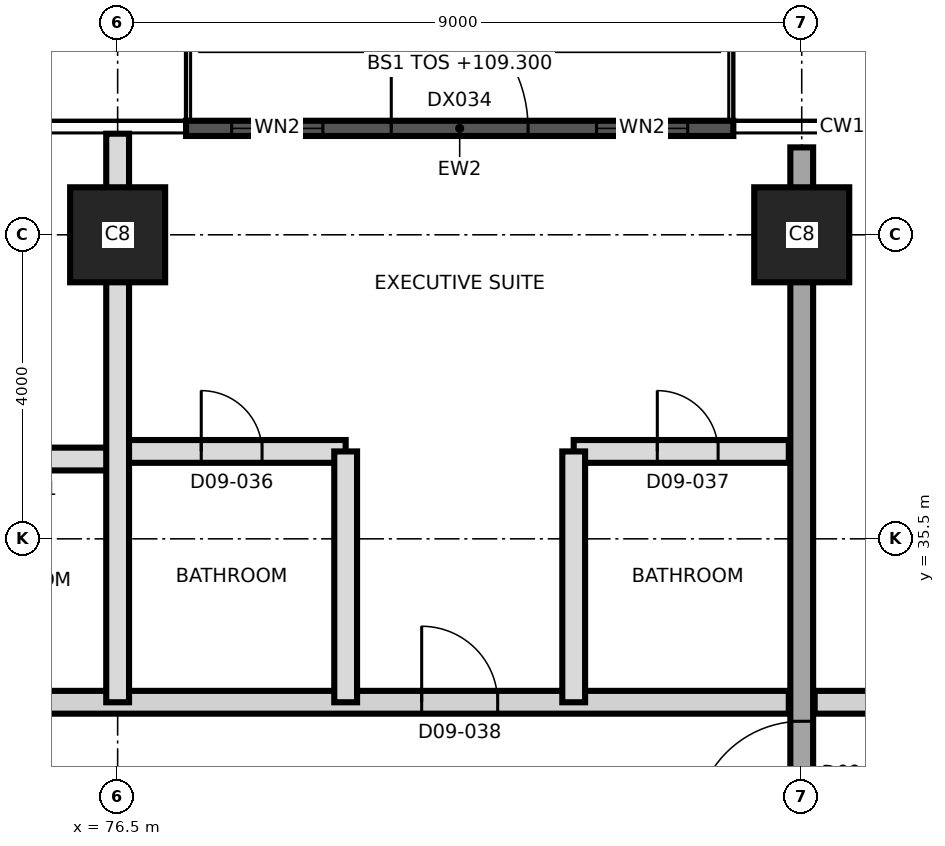
"""IFC4 building model, lengths in metres.
Left out: names, types, materials, properties, quantities, classifications, styles, units other than length and angle.
Written with IfcOpenShell. Run it as: python <this file> out.ifc"""

import sys

from ifc_helpers import new_model, si_unit, direction, frame, frame_2d, origin, origin_2d, place, context, subcontext, project, spatial, rectangle, extrude, element, fill, save


model = new_model("IFC4")
c1 = context("Model", 3, precision=1e-05, world=origin(), true_north=direction((0.0, 1.0)))
c2 = subcontext(c1, "Body", "Model", "MODEL_VIEW")
j1 = project(units=[si_unit("LENGTHUNIT", "METRE"), si_unit("PLANEANGLEUNIT", "RADIAN")], contexts=[c1])
p1 = place(None, origin())
s1 = spatial("IfcSite", under=j1, at=p1, CompositionType="ELEMENT")
p2 = place(p1, origin())
s2 = spatial("IfcBuilding", under=s1, at=p2, CompositionType="ELEMENT")
p3 = place(p2, frame((0.0, 0.0, 109.3)))
s3 = spatial("IfcBuildingStorey", under=s2, at=p3, CompositionType="ELEMENT", Elevation=109.3)
for number, where, z_axis, x_axis in (
    (1, (76.5, 39.5, 0.0), (0.0, 0.0, 1.0), (1.0, 0.0, 0.0)),
    (2, (85.5, 39.5, 0.0), (0.0, 0.0, 1.0), (1.0, 0.0, 0.0)),
):
    element("IfcColumn", number, at=place(p3, frame(where, z_axis=z_axis, x_axis=x_axis)), inside=s3, PredefinedType="COLUMN", context=c2, shape_type="SweptSolid", body=[
        extrude(rectangle(XDim=1.25, YDim=1.25, at=origin_2d()), origin(), (0.0, 0.0, 1.0), 3.7),
    ])
p4 = place(p3, frame((85.5, 20.35, 0.0), z_axis=(0.0, 0.0, 1.0), x_axis=(0.0, 1.0, 0.0)))
e3 = element("IfcWall", 3, at=p4, inside=s3, PredefinedType="SHEAR", context=c2, shape_type="SweptSolid", body=[
    extrude(rectangle(XDim=20.3, YDim=0.3, at=frame_2d((10.15, 0.0))), origin(), (0.0, 0.0, 1.0), 3.7),
])
p5 = place(p4, frame((11.35, 0.0, 0.0)))
e4 = element("IfcOpeningElement", 4, at=p5, cuts=e3, PredefinedType="OPENING", context=c2, shape_type="SweptSolid", body=[
    extrude(rectangle(XDim=1.4, YDim=2.1, at=frame_2d((0.7, 1.05))), frame((0.0, 0.16, 0.0), z_axis=(0.0, -1.0, 0.0), x_axis=(1.0, 0.0, 0.0)), (0.0, 0.0, 1.0), 0.32),
])
p6 = place(p3, frame((77.4, 40.9, 0.0), z_axis=(0.0, 0.0, 1.0), x_axis=(1.0, 0.0, 0.0)))
e5 = element("IfcWall", 5, at=p6, inside=s3, PredefinedType="SOLIDWALL", context=c2, shape_type="SweptSolid", body=[
    extrude(rectangle(XDim=7.2, YDim=0.2, at=frame_2d((3.6, 0.0))), origin(), (0.0, 0.0, 1.0), 3.4),
])
p7 = place(p6, frame((2.7, 0.0, 0.0)))
e6 = element("IfcOpeningElement", 6, at=p7, cuts=e5, PredefinedType="OPENING", context=c2, shape_type="SweptSolid", body=[
    extrude(rectangle(XDim=1.8, YDim=2.4, at=frame_2d((0.9, 1.2))), frame((0.0, 0.11, 0.0), z_axis=(0.0, -1.0, 0.0), x_axis=(1.0, 0.0, 0.0)), (0.0, 0.0, 1.0), 0.22),
])
p8 = place(p6, frame((5.4, 0.0, 0.9)))
e7 = element("IfcOpeningElement", 7, at=p8, cuts=e5, PredefinedType="OPENING", context=c2, shape_type="SweptSolid", body=[
    extrude(rectangle(XDim=1.2, YDim=2.1, at=frame_2d((0.6, 1.05))), frame((0.0, 0.11, 0.0), z_axis=(0.0, -1.0, 0.0), x_axis=(1.0, 0.0, 0.0)), (0.0, 0.0, 1.0), 0.22),
])
p9 = place(p6, frame((0.6, 0.0, 0.9)))
e8 = element("IfcOpeningElement", 8, at=p9, cuts=e5, PredefinedType="OPENING", context=c2, shape_type="SweptSolid", body=[
    extrude(rectangle(XDim=1.2, YDim=2.1, at=frame_2d((0.6, 1.05))), frame((0.0, 0.11, 0.0), z_axis=(0.0, -1.0, 0.0), x_axis=(1.0, 0.0, 0.0)), (0.0, 0.0, 1.0), 0.22),
])
p10 = place(p3, frame((58.8, 33.35, 0.0), z_axis=(0.0, 0.0, 1.0), x_axis=(1.0, 0.0, 0.0)))
e9 = element("IfcWall", 9, at=p10, inside=s3, PredefinedType="PARTITIONING", context=c2, shape_type="SweptSolid", body=[
    extrude(rectangle(XDim=26.53, YDim=0.3, at=frame_2d((13.265, 0.0))), origin(), (0.0, 0.0, 1.0), 3.4),
])
p11 = place(p10, frame((2.05, 0.0, 0.0)))
e10 = element("IfcOpeningElement", 10, at=p11, cuts=e9, PredefinedType="OPENING", context=c2, shape_type="SweptSolid", body=[
    extrude(rectangle(XDim=1.0, YDim=2.4, at=frame_2d((0.5, 1.2))), frame((0.0, 0.16, 0.0), z_axis=(0.0, -1.0, 0.0), x_axis=(1.0, 0.0, 0.0)), (0.0, 0.0, 1.0), 0.32),
])
p12 = place(p10, frame((11.95, 0.0, 0.0)))
e11 = element("IfcOpeningElement", 11, at=p12, cuts=e9, PredefinedType="OPENING", context=c2, shape_type="SweptSolid", body=[
    extrude(rectangle(XDim=1.0, YDim=2.1, at=frame_2d((0.5, 1.05))), frame((0.0, 0.16, 0.0), z_axis=(0.0, -1.0, 0.0), x_axis=(1.0, 0.0, 0.0)), (0.0, 0.0, 1.0), 0.32),
])
p13 = place(p10, frame((13.6, 0.0, 0.0)))
e12 = element("IfcOpeningElement", 12, at=p13, cuts=e9, PredefinedType="OPENING", context=c2, shape_type="SweptSolid", body=[
    extrude(rectangle(XDim=1.0, YDim=2.1, at=frame_2d((0.5, 1.05))), frame((0.0, 0.16, 0.0), z_axis=(0.0, -1.0, 0.0), x_axis=(1.0, 0.0, 0.0)), (0.0, 0.0, 1.0), 0.32),
])
p14 = place(p10, frame((21.7, 0.0, 0.0)))
e13 = element("IfcOpeningElement", 13, at=p14, cuts=e9, PredefinedType="OPENING", context=c2, shape_type="SweptSolid", body=[
    extrude(rectangle(XDim=1.0, YDim=2.4, at=frame_2d((0.5, 1.2))), frame((0.0, 0.16, 0.0), z_axis=(0.0, -1.0, 0.0), x_axis=(1.0, 0.0, 0.0)), (0.0, 0.0, 1.0), 0.32),
])
p15 = place(p3, frame((85.67, 33.35, 0.0), z_axis=(0.0, 0.0, 1.0), x_axis=(1.0, 0.0, 0.0)))
e14 = element("IfcWall", 14, at=p15, inside=s3, PredefinedType="PARTITIONING", context=c2, shape_type="SweptSolid", body=[
    extrude(rectangle(XDim=9.58, YDim=0.3, at=frame_2d((4.79, 0.0))), origin(), (0.0, 0.0, 1.0), 3.4),
])
p16 = place(p15, frame((1.83, 0.0, 0.0)))
e15 = element("IfcOpeningElement", 15, at=p16, cuts=e14, PredefinedType="OPENING", context=c2, shape_type="SweptSolid", body=[
    extrude(rectangle(XDim=1.0, YDim=2.1, at=frame_2d((0.5, 1.05))), frame((0.0, 0.16, 0.0), z_axis=(0.0, -1.0, 0.0), x_axis=(1.0, 0.0, 0.0)), (0.0, 0.0, 1.0), 0.32),
])
p17 = place(p15, frame((5.63, 0.0, 0.0)))
e16 = element("IfcOpeningElement", 16, at=p17, cuts=e14, PredefinedType="OPENING", context=c2, shape_type="SweptSolid", body=[
    extrude(rectangle(XDim=1.0, YDim=2.1, at=frame_2d((0.5, 1.05))), frame((0.0, 0.16, 0.0), z_axis=(0.0, -1.0, 0.0), x_axis=(1.0, 0.0, 0.0)), (0.0, 0.0, 1.0), 0.32),
])
p18 = place(p3, frame((73.8, 36.55, 0.0), z_axis=(0.0, 0.0, 1.0), x_axis=(1.0, 0.0, 0.0)))
e17 = element("IfcWall", 17, at=p18, inside=s3, PredefinedType="PARTITIONING", context=c2, shape_type="SweptSolid", body=[
    extrude(rectangle(XDim=2.7, YDim=0.3, at=frame_2d((1.35, 0.0))), origin(), (0.0, 0.0, 1.0), 3.4),
])
p19 = place(p18, frame((0.95, 0.0, 0.0)))
e18 = element("IfcOpeningElement", 18, at=p19, cuts=e17, PredefinedType="OPENING", context=c2, shape_type="SweptSolid", body=[
    extrude(rectangle(XDim=0.8, YDim=2.1, at=frame_2d((0.4, 1.05))), frame((0.0, 0.16, 0.0), z_axis=(0.0, -1.0, 0.0), x_axis=(1.0, 0.0, 0.0)), (0.0, 0.0, 1.0), 0.32),
])
p20 = place(p3, frame((76.5, 36.65, 0.0), z_axis=(0.0, 0.0, 1.0), x_axis=(1.0, 0.0, 0.0)))
e19 = element("IfcWall", 19, at=p20, inside=s3, PredefinedType="PARTITIONING", context=c2, shape_type="SweptSolid", body=[
    extrude(rectangle(XDim=3.0, YDim=0.3, at=frame_2d((1.5, 0.0))), origin(), (0.0, 0.0, 1.0), 3.4),
])
p21 = place(p20, frame((1.1, 0.0, 0.0)))
e20 = element("IfcOpeningElement", 20, at=p21, cuts=e19, PredefinedType="OPENING", context=c2, shape_type="SweptSolid", body=[
    extrude(rectangle(XDim=0.8, YDim=2.1, at=frame_2d((0.4, 1.05))), frame((0.0, 0.16, 0.0), z_axis=(0.0, -1.0, 0.0), x_axis=(1.0, 0.0, 0.0)), (0.0, 0.0, 1.0), 0.32),
])
p22 = place(p3, frame((82.5, 36.65, 0.0), z_axis=(0.0, 0.0, 1.0), x_axis=(1.0, 0.0, 0.0)))
e21 = element("IfcWall", 21, at=p22, inside=s3, PredefinedType="PARTITIONING", context=c2, shape_type="SweptSolid", body=[
    extrude(rectangle(XDim=2.83, YDim=0.3, at=frame_2d((1.415, 0.0))), origin(), (0.0, 0.0, 1.0), 3.4),
])
p23 = place(p22, frame((1.1, 0.0, 0.0)))
e22 = element("IfcOpeningElement", 22, at=p23, cuts=e21, PredefinedType="OPENING", context=c2, shape_type="SweptSolid", body=[
    extrude(rectangle(XDim=0.8, YDim=2.1, at=frame_2d((0.4, 1.05))), frame((0.0, 0.16, 0.0), z_axis=(0.0, -1.0, 0.0), x_axis=(1.0, 0.0, 0.0)), (0.0, 0.0, 1.0), 0.32),
])
p24 = place(p3, frame((76.5, 33.35, 0.0), z_axis=(0.0, 0.0, 1.0), x_axis=(0.0, 1.0, 0.0)))
e23 = element("IfcWall", 23, at=p24, inside=s3, PredefinedType="PARTITIONING", context=c2, shape_type="SweptSolid", body=[
    extrude(rectangle(XDim=7.48, YDim=0.3, at=frame_2d((3.74, 0.0))), origin(), (0.0, 0.0, 1.0), 3.4),
])
for number, where, z_axis, x_axis in (
    (24, (79.5, 33.35, 0.0), (0.0, 0.0, 1.0), (0.0, 1.0, 0.0)),
    (25, (82.5, 33.35, 0.0), (0.0, 0.0, 1.0), (0.0, 1.0, 0.0)),
):
    element("IfcWall", number, at=place(p3, frame(where, z_axis=z_axis, x_axis=x_axis)), inside=s3, PredefinedType="PARTITIONING", context=c2, shape_type="SweptSolid", body=[
        extrude(rectangle(XDim=3.3, YDim=0.3, at=frame_2d((1.65, 0.0))), origin(), (0.0, 0.0, 1.0), 3.4),
    ])
p25 = place(p7, origin())
e26 = element("IfcDoor", 26, at=p25, inside=s3, OperationType="SINGLE_SWING_LEFT", PredefinedType="DOOR", context=c2, shape_type="SweptSolid", body=[
    extrude(rectangle(XDim=1.8, YDim=2.4, at=frame_2d((0.9, 1.2))), frame((0.0, 0.025, 0.0), z_axis=(0.0, -1.0, 0.0), x_axis=(1.0, 0.0, 0.0)), (0.0, 0.0, 1.0), 0.05),
])
fill(e6, e26)
p26 = place(p8, origin())
e27 = element("IfcWindow", 27, at=p26, inside=s3, PartitioningType="SINGLE_PANEL", PredefinedType="WINDOW", context=c2, shape_type="SweptSolid", body=[
    extrude(rectangle(XDim=1.2, YDim=2.1, at=frame_2d((0.6, 1.05))), frame((0.0, 0.03, 0.0), z_axis=(0.0, -1.0, 0.0), x_axis=(1.0, 0.0, 0.0)), (0.0, 0.0, 1.0), 0.06),
])
fill(e7, e27)
p27 = place(p9, origin())
e28 = element("IfcWindow", 28, at=p27, inside=s3, PartitioningType="SINGLE_PANEL", PredefinedType="WINDOW", context=c2, shape_type="SweptSolid", body=[
    extrude(rectangle(XDim=1.2, YDim=2.1, at=frame_2d((0.6, 1.05))), frame((0.0, 0.03, 0.0), z_axis=(0.0, -1.0, 0.0), x_axis=(1.0, 0.0, 0.0)), (0.0, 0.0, 1.0), 0.06),
])
fill(e8, e28)
p28 = place(p21, origin())
e29 = element("IfcDoor", 29, at=p28, inside=s3, OperationType="SINGLE_SWING_LEFT", PredefinedType="DOOR", context=c2, shape_type="SweptSolid", body=[
    extrude(rectangle(XDim=0.8, YDim=2.1, at=frame_2d((0.4, 1.05))), frame((0.0, 0.025, 0.0), z_axis=(0.0, -1.0, 0.0), x_axis=(1.0, 0.0, 0.0)), (0.0, 0.0, 1.0), 0.05),
])
fill(e20, e29)
p29 = place(p23, origin())
e30 = element("IfcDoor", 30, at=p29, inside=s3, OperationType="SINGLE_SWING_RIGHT", PredefinedType="DOOR", context=c2, shape_type="SweptSolid", body=[
    extrude(rectangle(XDim=0.8, YDim=2.1, at=frame_2d((0.4, 1.05))), frame((0.0, 0.025, 0.0), z_axis=(0.0, -1.0, 0.0), x_axis=(1.0, 0.0, 0.0)), (0.0, 0.0, 1.0), 0.05),
])
fill(e22, e30)
p30 = place(p14, origin())
e31 = element("IfcDoor", 31, at=p30, inside=s3, OperationType="SINGLE_SWING_LEFT", PredefinedType="DOOR", context=c2, shape_type="SweptSolid", body=[
    extrude(rectangle(XDim=1.0, YDim=2.4, at=frame_2d((0.5, 1.2))), frame((0.0, 0.025, 0.0), z_axis=(0.0, -1.0, 0.0), x_axis=(1.0, 0.0, 0.0)), (0.0, 0.0, 1.0), 0.05),
])
fill(e13, e31)
p31 = place(p5, origin())
e32 = element("IfcDoor", 32, at=p31, inside=s3, OperationType="SINGLE_SWING_RIGHT", PredefinedType="DOOR", context=c2, shape_type="SweptSolid", body=[
    extrude(rectangle(XDim=1.4, YDim=2.1, at=frame_2d((0.7, 1.05))), frame((0.0, 0.025, 0.0), z_axis=(0.0, -1.0, 0.0), x_axis=(1.0, 0.0, 0.0)), (0.0, 0.0, 1.0), 0.05),
])
fill(e4, e32)
save(model, sys.argv[1])
